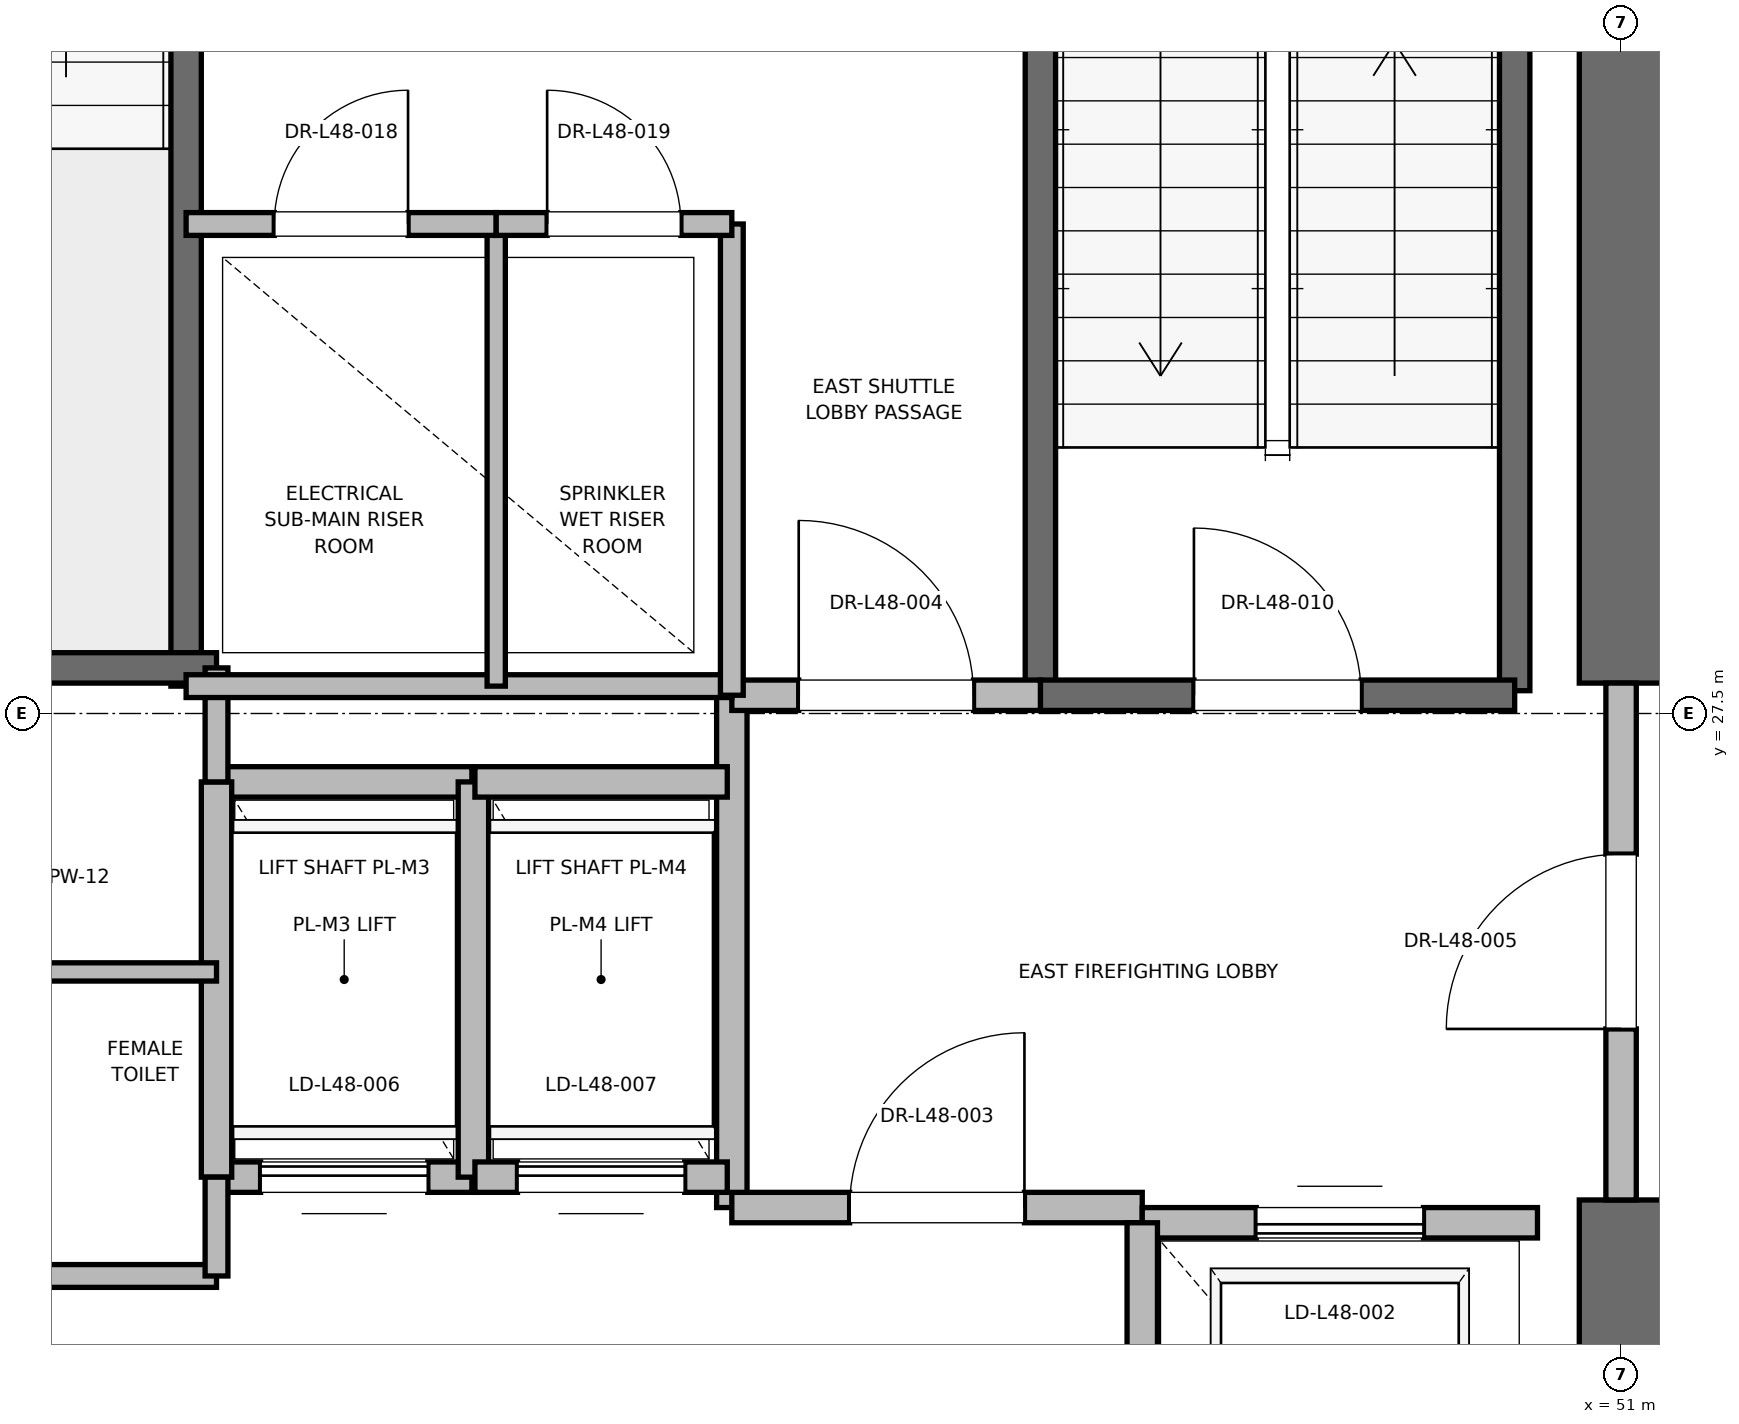
"""IFC4 building model, lengths in metres.
Left out: names, types, materials, properties, quantities, classifications, styles, units other than length and angle.
Written with IfcOpenShell. Run it as: python <this file> out.ifc"""

import sys

from ifc_helpers import new_model, si_unit, direction, frame, frame_2d, origin, place, context, subcontext, project, spatial, rectangle, extrude, element, fill, save


model = new_model("IFC4")
c1 = context("Model", 3, precision=1e-05, world=origin(), true_north=direction((0.0, 1.0)))
c2 = subcontext(c1, "Body", "Model", "MODEL_VIEW")
j1 = project(units=[si_unit("LENGTHUNIT", "METRE"), si_unit("PLANEANGLEUNIT", "RADIAN")], contexts=[c1])
p1 = place(None, origin())
s1 = spatial("IfcSite", under=j1, at=p1, CompositionType="ELEMENT")
p2 = place(p1, origin())
s2 = spatial("IfcBuilding", under=s1, at=p2, CompositionType="ELEMENT")
p3 = place(p2, frame((0.0, 0.0, 209.2)))
s3 = spatial("IfcBuildingStorey", under=s2, at=p3, CompositionType="ELEMENT", Elevation=209.2)
p4 = place(p3, frame((51.0, 18.5, 0.0), z_axis=(0.0, 0.0, 1.0), x_axis=(0.0, 1.0, 0.0)))
e1 = element("IfcWall", 1, at=p4, inside=s3, PredefinedType="SHEAR", context=c2, shape_type="SweptSolid", body=[
    extrude(rectangle(XDim=5.8, YDim=0.55, at=frame_2d((2.9, 0.0))), origin(), (0.0, 0.0, 1.0), 3.775),
])
p5 = place(p3, frame((51.0, 27.7, 0.0), z_axis=(0.0, 0.0, 1.0), x_axis=(0.0, 1.0, 0.0)))
e2 = element("IfcWall", 2, at=p5, inside=s3, PredefinedType="SHEAR", context=c2, shape_type="SweptSolid", body=[
    extrude(rectangle(XDim=8.8, YDim=0.55, at=frame_2d((4.4, 0.0))), origin(), (0.0, 0.0, 1.0), 3.775),
])
p6 = place(p3, frame((50.3, 27.65, 0.0), z_axis=(0.0, 0.0, 1.0), x_axis=(0.0, 1.0, 0.0)))
e3 = element("IfcWall", 3, at=p6, inside=s3, PredefinedType="SOLIDWALL", context=c2, shape_type="SweptSolid", body=[
    extrude(rectangle(XDim=8.15, YDim=0.2, at=frame_2d((4.075, 0.0))), origin(), (0.0, 0.0, 1.0), 3.775),
])
p7 = place(p3, frame((47.18, 27.62, 0.0), z_axis=(0.0, 0.0, 1.0), x_axis=(0.0, 1.0, 0.0)))
e4 = element("IfcWall", 4, at=p7, inside=s3, PredefinedType="SOLIDWALL", context=c2, shape_type="SweptSolid", body=[
    extrude(rectangle(XDim=8.18, YDim=0.2, at=frame_2d((4.09, 0.0))), origin(), (0.0, 0.0, 1.0), 3.775),
])
p8 = place(p3, frame((47.18, 27.62, 0.0), z_axis=(0.0, 0.0, 1.0), x_axis=(1.0, 0.0, 0.0)))
e5 = element("IfcWall", 5, at=p8, inside=s3, PredefinedType="SOLIDWALL", context=c2, shape_type="SweptSolid", body=[
    extrude(rectangle(XDim=3.12, YDim=0.2, at=frame_2d((1.56, 0.0))), origin(), (0.0, 0.0, 1.0), 3.775),
])
p9 = place(p8, frame((1.01, 0.0, 0.0)))
e6 = element("IfcOpeningElement", 6, at=p9, cuts=e5, PredefinedType="OPENING", context=c2, shape_type="SweptSolid", body=[
    extrude(rectangle(XDim=1.1, YDim=2.15, at=frame_2d((0.55, 1.075))), frame((0.0, 0.1, 0.0), z_axis=(0.0, -1.0, 0.0), x_axis=(1.0, 0.0, 0.0)), (0.0, 0.0, 1.0), 0.2),
])
p10 = place(p3, frame((41.56, 27.68, 0.0), z_axis=(0.0, 0.0, 1.0), x_axis=(0.0, 1.0, 0.0)))
e7 = element("IfcWall", 7, at=p10, inside=s3, PredefinedType="SOLIDWALL", context=c2, shape_type="SweptSolid", body=[
    extrude(rectangle(XDim=8.57, YDim=0.2, at=frame_2d((4.285, 0.0))), origin(), (0.0, 0.0, 1.0), 3.775),
])
p11 = place(p3, frame((38.44, 27.8, 0.0), z_axis=(0.0, 0.0, 1.0), x_axis=(1.0, 0.0, 0.0)))
e8 = element("IfcWall", 8, at=p11, inside=s3, PredefinedType="SOLIDWALL", context=c2, shape_type="SweptSolid", body=[
    extrude(rectangle(XDim=3.32, YDim=0.2, at=frame_2d((1.66, 0.0))), origin(), (0.0, 0.0, 1.0), 3.775),
])
p12 = place(p3, frame((45.15, 24.25, 0.0), z_axis=(0.0, 0.0, 1.0), x_axis=(0.0, 1.0, 0.0)))
e9 = element("IfcWall", 9, at=p12, inside=s3, PredefinedType="PARTITIONING", context=c2, shape_type="SweptSolid", body=[
    extrude(rectangle(XDim=3.37, YDim=0.2, at=frame_2d((1.685, 0.0))), origin(), (0.0, 0.0, 1.0), 3.775),
])
p13 = place(p3, frame((45.15, 24.25, 0.0), z_axis=(0.0, 0.0, 1.0), x_axis=(1.0, 0.0, 0.0)))
e10 = element("IfcWall", 10, at=p13, inside=s3, PredefinedType="PARTITIONING", context=c2, shape_type="SweptSolid", body=[
    extrude(rectangle(XDim=2.7, YDim=0.2, at=frame_2d((1.35, 0.0))), origin(), (0.0, 0.0, 1.0), 3.775),
])
p14 = place(p13, frame((0.775, 0.0, 0.0)))
e11 = element("IfcOpeningElement", 11, at=p14, cuts=e10, PredefinedType="OPENING", context=c2, shape_type="SweptSolid", body=[
    extrude(rectangle(XDim=1.15, YDim=2.2, at=frame_2d((0.575, 1.1))), frame((0.0, 0.1, 0.0), z_axis=(0.0, -1.0, 0.0), x_axis=(1.0, 0.0, 0.0)), (0.0, 0.0, 1.0), 0.2),
])
p15 = place(p3, frame((45.15, 27.62, 0.0), z_axis=(0.0, 0.0, 1.0), x_axis=(1.0, 0.0, 0.0)))
e12 = element("IfcWall", 12, at=p15, inside=s3, PredefinedType="PARTITIONING", context=c2, shape_type="SweptSolid", body=[
    extrude(rectangle(XDim=2.03, YDim=0.2, at=frame_2d((1.015, 0.0))), origin(), (0.0, 0.0, 1.0), 3.775),
])
p16 = place(p15, frame((0.44, 0.0, 0.0)))
e13 = element("IfcOpeningElement", 13, at=p16, cuts=e12, PredefinedType="OPENING", context=c2, shape_type="SweptSolid", body=[
    extrude(rectangle(XDim=1.15, YDim=2.2, at=frame_2d((0.575, 1.1))), frame((0.0, 0.1, 0.0), z_axis=(0.0, -1.0, 0.0), x_axis=(1.0, 0.0, 0.0)), (0.0, 0.0, 1.0), 0.2),
])
p17 = place(p3, frame((51.0, 24.3, 0.0), z_axis=(0.0, 0.0, 1.0), x_axis=(0.0, 1.0, 0.0)))
e14 = element("IfcWall", 14, at=p17, inside=s3, PredefinedType="PARTITIONING", context=c2, shape_type="SweptSolid", body=[
    extrude(rectangle(XDim=3.4, YDim=0.2, at=frame_2d((1.7, 0.0))), origin(), (0.0, 0.0, 1.0), 2.755),
])
p18 = place(p17, frame((1.125, 0.0, 0.0)))
e15 = element("IfcOpeningElement", 15, at=p18, cuts=e14, PredefinedType="OPENING", context=c2, shape_type="SweptSolid", body=[
    extrude(rectangle(XDim=1.15, YDim=2.2, at=frame_2d((0.575, 1.1))), frame((0.0, 0.1, 0.0), z_axis=(0.0, -1.0, 0.0), x_axis=(1.0, 0.0, 0.0)), (0.0, 0.0, 1.0), 0.2),
])
p19 = place(p3, frame((50.45, 24.15, 0.0), z_axis=(0.0, 0.0, 1.0), x_axis=(-1.0, 0.0, 0.0)))
e16 = element("IfcWall", 16, at=p19, inside=s3, PredefinedType="SOLIDWALL", context=c2, shape_type="SweptSolid", body=[
    extrude(rectangle(XDim=2.6, YDim=0.2, at=frame_2d((1.3, 0.0))), origin(), (0.0, 0.0, 1.0), 2.755),
])
p20 = place(p19, frame((0.75, 0.0, 0.0)))
e17 = element("IfcOpeningElement", 17, at=p20, cuts=e16, PredefinedType="OPENING", context=c2, shape_type="SweptSolid", body=[
    extrude(rectangle(XDim=1.1, YDim=2.2, at=frame_2d((0.55, 1.1))), frame((0.0, 0.1, 0.0), z_axis=(0.0, -1.0, 0.0), x_axis=(1.0, 0.0, 0.0)), (0.0, 0.0, 1.0), 0.2),
])
p21 = place(p3, frame((47.85, 24.15, 0.0), z_axis=(0.0, 0.0, 1.0), x_axis=(0.0, -1.0, 0.0)))
e18 = element("IfcWall", 18, at=p21, inside=s3, PredefinedType="SOLIDWALL", context=c2, shape_type="SweptSolid", body=[
    extrude(rectangle(XDim=3.0, YDim=0.2, at=frame_2d((1.5, 0.0))), origin(), (0.0, 0.0, 1.0), 3.775),
])
p22 = place(p3, frame((41.76, 24.45, 0.0), z_axis=(0.0, 0.0, 1.0), x_axis=(1.0, 0.0, 0.0)))
e19 = element("IfcWall", 19, at=p22, inside=s3, PredefinedType="SOLIDWALL", context=c2, shape_type="SweptSolid", body=[
    extrude(rectangle(XDim=1.68, YDim=0.2, at=frame_2d((0.84, 0.0))), origin(), (0.0, 0.0, 1.0), 3.775),
])
p23 = place(p22, frame((0.29, 0.0, 0.0)))
e20 = element("IfcOpeningElement", 20, at=p23, cuts=e19, PredefinedType="OPENING", context=c2, shape_type="SweptSolid", body=[
    extrude(rectangle(XDim=1.1, YDim=2.2, at=frame_2d((0.55, 1.1))), frame((0.0, 0.1, 0.0), z_axis=(0.0, -1.0, 0.0), x_axis=(1.0, 0.0, 0.0)), (0.0, 0.0, 1.0), 0.2),
])
p24 = place(p3, frame((43.44, 27.05, 0.0), z_axis=(0.0, 0.0, 1.0), x_axis=(-1.0, 0.0, 0.0)))
e21 = element("IfcWall", 21, at=p24, inside=s3, PredefinedType="SOLIDWALL", context=c2, shape_type="SweptSolid", body=[
    extrude(rectangle(XDim=1.68, YDim=0.2, at=frame_2d((0.84, 0.0))), origin(), (0.0, 0.0, 1.0), 3.775),
])
for number, where, z_axis, x_axis in (
    (22, (41.76, 27.05, 0.0), (0.0, 0.0, 1.0), (0.0, -1.0, 0.0)),
    (23, (43.45, 24.45, 0.0), (0.0, 0.0, 1.0), (0.0, 1.0, 0.0)),
):
    element("IfcWall", number, at=place(p3, frame(where, z_axis=z_axis, x_axis=x_axis)), inside=s3, PredefinedType="SOLIDWALL", context=c2, shape_type="SweptSolid", body=[
        extrude(rectangle(XDim=2.6, YDim=0.2, at=frame_2d((1.3, 0.0))), origin(), (0.0, 0.0, 1.0), 3.775),
    ])
p25 = place(p3, frame((43.46, 24.45, 0.0), z_axis=(0.0, 0.0, 1.0), x_axis=(1.0, 0.0, 0.0)))
e24 = element("IfcWall", 24, at=p25, inside=s3, PredefinedType="SOLIDWALL", context=c2, shape_type="SweptSolid", body=[
    extrude(rectangle(XDim=1.66, YDim=0.2, at=frame_2d((0.83, 0.0))), origin(), (0.0, 0.0, 1.0), 3.775),
])
p26 = place(p25, frame((0.28, 0.0, 0.0)))
e25 = element("IfcOpeningElement", 25, at=p26, cuts=e24, PredefinedType="OPENING", context=c2, shape_type="SweptSolid", body=[
    extrude(rectangle(XDim=1.1, YDim=2.2, at=frame_2d((0.55, 1.1))), frame((0.0, 0.1, 0.0), z_axis=(0.0, -1.0, 0.0), x_axis=(1.0, 0.0, 0.0)), (0.0, 0.0, 1.0), 0.2),
])
p27 = place(p3, frame((45.12, 27.05, 0.0), z_axis=(0.0, 0.0, 1.0), x_axis=(-1.0, 0.0, 0.0)))
e26 = element("IfcWall", 26, at=p27, inside=s3, PredefinedType="SOLIDWALL", context=c2, shape_type="SweptSolid", body=[
    extrude(rectangle(XDim=1.66, YDim=0.2, at=frame_2d((0.83, 0.0))), origin(), (0.0, 0.0, 1.0), 3.775),
])
p28 = place(p3, frame((39.95, 23.8, 0.0), z_axis=(0.0, 0.0, 1.0), x_axis=(1.0, 0.0, 0.0)))
e27 = element("IfcWall", 27, at=p28, inside=s3, PredefinedType="PARTITIONING", context=c2, shape_type="SweptSolid", body=[
    extrude(rectangle(XDim=1.81, YDim=0.15, at=frame_2d((0.905, 0.0))), origin(), (0.0, 0.0, 1.0), 2.85),
])
p29 = place(p3, frame((39.95, 25.8, 0.0), z_axis=(0.0, 0.0, 1.0), x_axis=(1.0, 0.0, 0.0)))
e28 = element("IfcWall", 28, at=p29, inside=s3, PredefinedType="PARTITIONING", context=c2, shape_type="SweptSolid", body=[
    extrude(rectangle(XDim=1.81, YDim=0.12, at=frame_2d((0.905, 0.0))), origin(), (0.0, 0.0, 1.0), 2.85),
])
p30 = place(p3, frame((41.76, 23.8, 0.0), z_axis=(0.0, 0.0, 1.0), x_axis=(0.0, 1.0, 0.0)))
e29 = element("IfcWall", 29, at=p30, inside=s3, PredefinedType="PARTITIONING", context=c2, shape_type="SweptSolid", body=[
    extrude(rectangle(XDim=0.65, YDim=0.15, at=frame_2d((0.325, 0.0))), origin(), (0.0, 0.0, 1.0), 2.85),
])
p31 = place(p3, frame((41.76, 27.05, 0.0), z_axis=(0.0, 0.0, 1.0), x_axis=(0.0, 1.0, 0.0)))
e30 = element("IfcWall", 30, at=p31, inside=s3, PredefinedType="PARTITIONING", context=c2, shape_type="SweptSolid", body=[
    extrude(rectangle(XDim=0.75, YDim=0.15, at=frame_2d((0.375, 0.0))), origin(), (0.0, 0.0, 1.0), 2.85),
])
p32 = place(p3, frame((41.56, 27.68, 0.0), z_axis=(0.0, 0.0, 1.0), x_axis=(1.0, 0.0, 0.0)))
e31 = element("IfcWall", 31, at=p32, inside=s3, PredefinedType="PARTITIONING", context=c2, shape_type="SweptSolid", body=[
    extrude(rectangle(XDim=3.59, YDim=0.15, at=frame_2d((1.795, 0.0))), origin(), (0.0, 0.0, 1.0), 2.85),
])
p33 = place(p3, frame((45.15, 27.62, 0.0), z_axis=(0.0, 0.0, 1.0), x_axis=(0.0, 1.0, 0.0)))
e32 = element("IfcWall", 32, at=p33, inside=s3, PredefinedType="PARTITIONING", context=c2, shape_type="SweptSolid", body=[
    extrude(rectangle(XDim=3.1, YDim=0.15, at=frame_2d((1.55, 0.0))), origin(), (0.0, 0.0, 1.0), 2.85),
])
p34 = place(p3, frame((43.6, 27.68, 0.0), z_axis=(0.0, 0.0, 1.0), x_axis=(0.0, 1.0, 0.0)))
e33 = element("IfcWall", 33, at=p34, inside=s3, PredefinedType="PARTITIONING", context=c2, shape_type="SweptSolid", body=[
    extrude(rectangle(XDim=3.04, YDim=0.12, at=frame_2d((1.52, 0.0))), origin(), (0.0, 0.0, 1.0), 2.85),
])
p35 = place(p3, frame((41.56, 30.72, 0.0), z_axis=(0.0, 0.0, 1.0), x_axis=(1.0, 0.0, 0.0)))
e34 = element("IfcWall", 34, at=p35, inside=s3, PredefinedType="PARTITIONING", context=c2, shape_type="SweptSolid", body=[
    extrude(rectangle(XDim=2.04, YDim=0.15, at=frame_2d((1.02, 0.0))), origin(), (0.0, 0.0, 1.0), 2.85),
])
p36 = place(p35, frame((0.58, 0.0, 0.0)))
e35 = element("IfcOpeningElement", 35, at=p36, cuts=e34, PredefinedType="OPENING", context=c2, shape_type="SweptSolid", body=[
    extrude(rectangle(XDim=0.88, YDim=2.1, at=frame_2d((0.44, 1.05))), frame((0.0, 0.075, 0.0), z_axis=(0.0, -1.0, 0.0), x_axis=(1.0, 0.0, 0.0)), (0.0, 0.0, 1.0), 0.15),
])
p37 = place(p3, frame((43.6, 30.72, 0.0), z_axis=(0.0, 0.0, 1.0), x_axis=(1.0, 0.0, 0.0)))
e36 = element("IfcWall", 36, at=p37, inside=s3, PredefinedType="PARTITIONING", context=c2, shape_type="SweptSolid", body=[
    extrude(rectangle(XDim=1.55, YDim=0.15, at=frame_2d((0.775, 0.0))), origin(), (0.0, 0.0, 1.0), 2.85),
])
p38 = place(p37, frame((0.335, 0.0, 0.0)))
e37 = element("IfcOpeningElement", 37, at=p38, cuts=e36, PredefinedType="OPENING", context=c2, shape_type="SweptSolid", body=[
    extrude(rectangle(XDim=0.88, YDim=2.1, at=frame_2d((0.44, 1.05))), frame((0.0, 0.075, 0.0), z_axis=(0.0, -1.0, 0.0), x_axis=(1.0, 0.0, 0.0)), (0.0, 0.0, 1.0), 0.15),
])
p39 = place(p9, origin())
e38 = element("IfcDoor", 38, at=p39, inside=s3, OperationType="SINGLE_SWING_LEFT", PredefinedType="DOOR", context=c2, shape_type="SweptSolid", body=[
    extrude(rectangle(XDim=1.1, YDim=2.15, at=frame_2d((0.55, 1.075))), frame((0.0, 0.025, 0.0), z_axis=(0.0, -1.0, 0.0), x_axis=(1.0, 0.0, 0.0)), (0.0, 0.0, 1.0), 0.05),
])
fill(e6, e38)
p40 = place(p14, origin())
e39 = element("IfcDoor", 39, at=p40, inside=s3, OperationType="SINGLE_SWING_RIGHT", PredefinedType="DOOR", context=c2, shape_type="SweptSolid", body=[
    extrude(rectangle(XDim=1.15, YDim=2.2, at=frame_2d((0.575, 1.1))), frame((0.0, 0.025, 0.0), z_axis=(0.0, -1.0, 0.0), x_axis=(1.0, 0.0, 0.0)), (0.0, 0.0, 1.0), 0.05),
])
fill(e11, e39)
p41 = place(p16, origin())
e40 = element("IfcDoor", 40, at=p41, inside=s3, OperationType="SINGLE_SWING_LEFT", PredefinedType="DOOR", context=c2, shape_type="SweptSolid", body=[
    extrude(rectangle(XDim=1.15, YDim=2.2, at=frame_2d((0.575, 1.1))), frame((0.0, 0.025, 0.0), z_axis=(0.0, -1.0, 0.0), x_axis=(1.0, 0.0, 0.0)), (0.0, 0.0, 1.0), 0.05),
])
fill(e13, e40)
p42 = place(p18, origin())
e41 = element("IfcDoor", 41, at=p42, inside=s3, OperationType="SINGLE_SWING_LEFT", PredefinedType="DOOR", context=c2, shape_type="SweptSolid", body=[
    extrude(rectangle(XDim=1.15, YDim=2.2, at=frame_2d((0.575, 1.1))), frame((0.0, 0.025, 0.0), z_axis=(0.0, -1.0, 0.0), x_axis=(1.0, 0.0, 0.0)), (0.0, 0.0, 1.0), 0.05),
])
fill(e15, e41)
p43 = place(p20, origin())
e42 = element("IfcDoor", 42, at=p43, inside=s3, OperationType="SLIDING_TO_RIGHT", PredefinedType="DOOR", context=c2, shape_type="SweptSolid", body=[
    extrude(rectangle(XDim=1.1, YDim=2.2, at=frame_2d((0.55, 1.1))), frame((0.0, 0.025, 0.0), z_axis=(0.0, -1.0, 0.0), x_axis=(1.0, 0.0, 0.0)), (0.0, 0.0, 1.0), 0.05),
])
fill(e17, e42)
p44 = place(p23, origin())
e43 = element("IfcDoor", 43, at=p44, inside=s3, OperationType="SLIDING_TO_RIGHT", PredefinedType="DOOR", context=c2, shape_type="SweptSolid", body=[
    extrude(rectangle(XDim=1.1, YDim=2.2, at=frame_2d((0.55, 1.1))), frame((0.0, 0.025, 0.0), z_axis=(0.0, -1.0, 0.0), x_axis=(1.0, 0.0, 0.0)), (0.0, 0.0, 1.0), 0.05),
])
fill(e20, e43)
p45 = place(p26, origin())
e44 = element("IfcDoor", 44, at=p45, inside=s3, OperationType="SLIDING_TO_RIGHT", PredefinedType="DOOR", context=c2, shape_type="SweptSolid", body=[
    extrude(rectangle(XDim=1.1, YDim=2.2, at=frame_2d((0.55, 1.1))), frame((0.0, 0.025, 0.0), z_axis=(0.0, -1.0, 0.0), x_axis=(1.0, 0.0, 0.0)), (0.0, 0.0, 1.0), 0.05),
])
fill(e25, e44)
p46 = place(p36, origin())
e45 = element("IfcDoor", 45, at=p46, inside=s3, OperationType="SINGLE_SWING_RIGHT", PredefinedType="DOOR", context=c2, shape_type="SweptSolid", body=[
    extrude(rectangle(XDim=0.88, YDim=2.1, at=frame_2d((0.44, 1.05))), frame((0.0, 0.025, 0.0), z_axis=(0.0, -1.0, 0.0), x_axis=(1.0, 0.0, 0.0)), (0.0, 0.0, 1.0), 0.05),
])
fill(e35, e45)
p47 = place(p38, origin())
e46 = element("IfcDoor", 46, at=p47, inside=s3, OperationType="SINGLE_SWING_LEFT", PredefinedType="DOOR", context=c2, shape_type="SweptSolid", body=[
    extrude(rectangle(XDim=0.88, YDim=2.1, at=frame_2d((0.44, 1.05))), frame((0.0, 0.025, 0.0), z_axis=(0.0, -1.0, 0.0), x_axis=(1.0, 0.0, 0.0)), (0.0, 0.0, 1.0), 0.05),
])
fill(e37, e46)
save(model, sys.argv[1])
